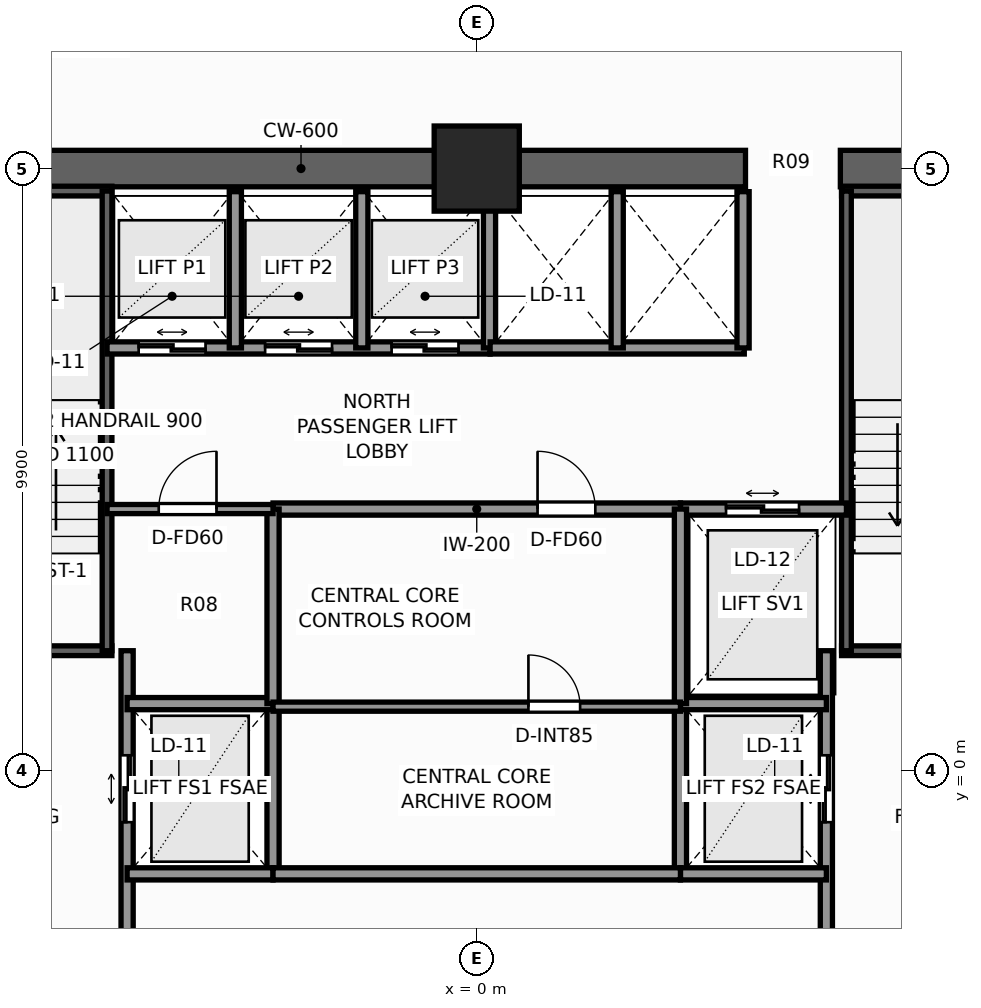
"""IFC4 building model, lengths in metres.
Left out: names, types, materials, properties, quantities, classifications, styles, units other than length and angle.
Written with IfcOpenShell. Run it as: python <this file> out.ifc"""

import sys

from ifc_helpers import new_model, si_unit, direction, frame, frame_2d, origin, origin_2d, place, context, subcontext, project, spatial, rectangle, extrude, element, fill, save


model = new_model("IFC4")
c1 = context("Model", 3, precision=1e-05, world=origin(), true_north=direction((0.0, 1.0)))
c2 = subcontext(c1, "Body", "Model", "MODEL_VIEW")
j1 = project(units=[si_unit("LENGTHUNIT", "METRE"), si_unit("PLANEANGLEUNIT", "RADIAN")], contexts=[c1])
p1 = place(None, origin())
s1 = spatial("IfcSite", under=j1, at=p1, CompositionType="ELEMENT")
p2 = place(p1, origin())
s2 = spatial("IfcBuilding", under=s1, at=p2, CompositionType="ELEMENT")
p3 = place(p2, frame((0.0, 0.0, 33.7)))
s3 = spatial("IfcBuildingStorey", under=s2, at=p3, CompositionType="ELEMENT", Elevation=33.7)
p4 = place(p3, frame((-10.2, 9.9, 0.0), z_axis=(0.0, 0.0, 1.0), x_axis=(1.0, 0.0, 0.0)))
e1 = element("IfcWall", 1, at=p4, inside=s3, PredefinedType="SHEAR", context=c2, shape_type="SweptSolid", body=[
    extrude(rectangle(XDim=14.62, YDim=0.6, at=frame_2d((7.31, 0.0))), origin(), (0.0, 0.0, 1.0), 3.3),
])
p5 = place(p3, frame((5.98, 9.9, 0.0), z_axis=(0.0, 0.0, 1.0), x_axis=(1.0, 0.0, 0.0)))
e2 = element("IfcWall", 2, at=p5, inside=s3, PredefinedType="SHEAR", context=c2, shape_type="SweptSolid", body=[
    extrude(rectangle(XDim=4.22, YDim=0.6, at=frame_2d((2.11, 0.0))), origin(), (0.0, 0.0, 1.0), 3.3),
])
p6 = place(p3, frame((0.0, 9.9, 0.0), z_axis=(0.0, 0.0, 1.0), x_axis=(1.0, 0.0, 0.0)))
e3 = element("IfcColumn", 3, at=p6, inside=s3, PredefinedType="COLUMN", context=c2, shape_type="SweptSolid", body=[
    extrude(rectangle(XDim=1.4, YDim=1.4, at=origin_2d()), origin(), (0.0, 0.0, 1.0), 3.3),
])
p7 = place(p3, frame((-9.52, 1.97, 0.0), z_axis=(0.0, 0.0, 1.0), x_axis=(1.0, 0.0, 0.0)))
e4 = element("IfcWall", 4, at=p7, inside=s3, PredefinedType="SHEAR", context=c2, shape_type="SweptSolid", body=[
    extrude(rectangle(XDim=3.52, YDim=0.16, at=frame_2d((1.76, 0.0))), origin(), (0.0, 0.0, 1.0), 3.3),
])
p8 = place(p7, frame((1.15, 0.0, 0.0)))
e5 = element("IfcOpeningElement", 5, at=p8, cuts=e4, PredefinedType="OPENING", context=c2, shape_type="SweptSolid", body=[
    extrude(rectangle(XDim=1.1, YDim=2.2, at=frame_2d((0.55, 1.1))), frame((0.0, 0.09, 0.0), z_axis=(0.0, -1.0, 0.0), x_axis=(1.0, 0.0, 0.0)), (0.0, 0.0, 1.0), 0.18),
])
p9 = place(p3, frame((-9.52, 9.53, 0.0), z_axis=(0.0, 0.0, 1.0), x_axis=(1.0, 0.0, 0.0)))
e6 = element("IfcWall", 6, at=p9, inside=s3, PredefinedType="SHEAR", context=c2, shape_type="SweptSolid", body=[
    extrude(rectangle(XDim=3.52, YDim=0.16, at=frame_2d((1.76, 0.0))), origin(), (0.0, 0.0, 1.0), 3.3),
])
p10 = place(p3, frame((-6.08, 1.97, 0.0), z_axis=(0.0, 0.0, 1.0), x_axis=(0.0, 1.0, 0.0)))
e7 = element("IfcWall", 7, at=p10, inside=s3, PredefinedType="SHEAR", context=c2, shape_type="SweptSolid", body=[
    extrude(rectangle(XDim=7.56, YDim=0.16, at=frame_2d((3.78, 0.0))), origin(), (0.0, 0.0, 1.0), 3.3),
])
p11 = place(p3, frame((6.0, 1.97, 0.0), z_axis=(0.0, 0.0, 1.0), x_axis=(1.0, 0.0, 0.0)))
e8 = element("IfcWall", 8, at=p11, inside=s3, PredefinedType="SHEAR", context=c2, shape_type="SweptSolid", body=[
    extrude(rectangle(XDim=3.52, YDim=0.16, at=frame_2d((1.76, 0.0))), origin(), (0.0, 0.0, 1.0), 3.3),
])
p12 = place(p11, frame((1.15, 0.0, 0.0)))
e9 = element("IfcOpeningElement", 9, at=p12, cuts=e8, PredefinedType="OPENING", context=c2, shape_type="SweptSolid", body=[
    extrude(rectangle(XDim=1.1, YDim=2.2, at=frame_2d((0.55, 1.1))), frame((0.0, 0.09, 0.0), z_axis=(0.0, -1.0, 0.0), x_axis=(1.0, 0.0, 0.0)), (0.0, 0.0, 1.0), 0.18),
])
p13 = place(p3, frame((6.0, 9.53, 0.0), z_axis=(0.0, 0.0, 1.0), x_axis=(1.0, 0.0, 0.0)))
e10 = element("IfcWall", 10, at=p13, inside=s3, PredefinedType="SHEAR", context=c2, shape_type="SweptSolid", body=[
    extrude(rectangle(XDim=3.52, YDim=0.16, at=frame_2d((1.76, 0.0))), origin(), (0.0, 0.0, 1.0), 3.3),
])
p14 = place(p3, frame((6.08, 1.97, 0.0), z_axis=(0.0, 0.0, 1.0), x_axis=(0.0, 1.0, 0.0)))
e11 = element("IfcWall", 11, at=p14, inside=s3, PredefinedType="SHEAR", context=c2, shape_type="SweptSolid", body=[
    extrude(rectangle(XDim=7.56, YDim=0.16, at=frame_2d((3.78, 0.0))), origin(), (0.0, 0.0, 1.0), 3.3),
])
p15 = place(p3, frame((-5.75, -3.6, 0.0), z_axis=(0.0, 0.0, 1.0), x_axis=(0.0, 1.0, 0.0)))
e12 = element("IfcWall", 12, at=p15, inside=s3, PredefinedType="SOLIDWALL", context=c2, shape_type="SweptSolid", body=[
    extrude(rectangle(XDim=5.57, YDim=0.2, at=frame_2d((2.785, 0.0))), origin(), (0.0, 0.0, 1.0), 3.06),
])
p16 = place(p15, frame((2.75, 0.0, 0.0)))
e13 = element("IfcOpeningElement", 13, at=p16, cuts=e12, PredefinedType="OPENING", context=c2, shape_type="SweptSolid", body=[
    extrude(rectangle(XDim=1.1, YDim=2.2, at=frame_2d((0.55, 1.1))), frame((0.0, 0.11, 0.0), z_axis=(0.0, -1.0, 0.0), x_axis=(1.0, 0.0, 0.0)), (0.0, 0.0, 1.0), 0.22),
])
p17 = place(p3, frame((-3.35, -1.7, 0.0), z_axis=(0.0, 0.0, 1.0), x_axis=(0.0, 1.0, 0.0)))
e14 = element("IfcWall", 14, at=p17, inside=s3, PredefinedType="SOLIDWALL", context=c2, shape_type="SweptSolid", body=[
    extrude(rectangle(XDim=2.8, YDim=0.2, at=frame_2d((1.4, 0.0))), origin(), (0.0, 0.0, 1.0), 3.06),
])
for number, where, z_axis, x_axis in (
    (15, (-5.75, -1.7, 0.0), (0.0, 0.0, 1.0), (1.0, 0.0, 0.0)),
    (16, (-5.75, 1.1, 0.0), (0.0, 0.0, 1.0), (1.0, 0.0, 0.0)),
):
    element("IfcWall", number, at=place(p3, frame(where, z_axis=z_axis, x_axis=x_axis)), inside=s3, PredefinedType="SOLIDWALL", context=c2, shape_type="SweptSolid", body=[
        extrude(rectangle(XDim=2.4, YDim=0.2, at=frame_2d((1.2, 0.0))), origin(), (0.0, 0.0, 1.0), 3.06),
    ])
p18 = place(p3, frame((5.75, -3.6, 0.0), z_axis=(0.0, 0.0, 1.0), x_axis=(0.0, 1.0, 0.0)))
e17 = element("IfcWall", 17, at=p18, inside=s3, PredefinedType="SOLIDWALL", context=c2, shape_type="SweptSolid", body=[
    extrude(rectangle(XDim=5.57, YDim=0.2, at=frame_2d((2.785, 0.0))), origin(), (0.0, 0.0, 1.0), 3.06),
])
p19 = place(p18, frame((2.75, 0.0, 0.0)))
e18 = element("IfcOpeningElement", 18, at=p19, cuts=e17, PredefinedType="OPENING", context=c2, shape_type="SweptSolid", body=[
    extrude(rectangle(XDim=1.1, YDim=2.2, at=frame_2d((0.55, 1.1))), frame((0.0, 0.11, 0.0), z_axis=(0.0, -1.0, 0.0), x_axis=(1.0, 0.0, 0.0)), (0.0, 0.0, 1.0), 0.22),
])
p20 = place(p3, frame((3.35, -1.7, 0.0), z_axis=(0.0, 0.0, 1.0), x_axis=(0.0, 1.0, 0.0)))
e19 = element("IfcWall", 19, at=p20, inside=s3, PredefinedType="SOLIDWALL", context=c2, shape_type="SweptSolid", body=[
    extrude(rectangle(XDim=2.8, YDim=0.2, at=frame_2d((1.4, 0.0))), origin(), (0.0, 0.0, 1.0), 3.06),
])
for number, where, z_axis, x_axis in (
    (20, (3.35, -1.7, 0.0), (0.0, 0.0, 1.0), (1.0, 0.0, 0.0)),
    (21, (3.35, 1.1, 0.0), (0.0, 0.0, 1.0), (1.0, 0.0, 0.0)),
):
    element("IfcWall", number, at=place(p3, frame(where, z_axis=z_axis, x_axis=x_axis)), inside=s3, PredefinedType="SOLIDWALL", context=c2, shape_type="SweptSolid", body=[
        extrude(rectangle(XDim=2.4, YDim=0.2, at=frame_2d((1.2, 0.0))), origin(), (0.0, 0.0, 1.0), 3.06),
    ])
p21 = place(p3, frame((3.35, 4.3, 0.0), z_axis=(0.0, 0.0, 1.0), x_axis=(1.0, 0.0, 0.0)))
e22 = element("IfcWall", 22, at=p21, inside=s3, PredefinedType="SOLIDWALL", context=c2, shape_type="SweptSolid", body=[
    extrude(rectangle(XDim=2.73, YDim=0.2, at=frame_2d((1.365, 0.0))), origin(), (0.0, 0.0, 1.0), 3.06),
])
p22 = place(p21, frame((0.75, 0.0, 0.0)))
e23 = element("IfcOpeningElement", 23, at=p22, cuts=e22, PredefinedType="OPENING", context=c2, shape_type="SweptSolid", body=[
    extrude(rectangle(XDim=1.2, YDim=2.25, at=frame_2d((0.6, 1.125))), frame((0.0, 0.11, 0.0), z_axis=(0.0, -1.0, 0.0), x_axis=(1.0, 0.0, 0.0)), (0.0, 0.0, 1.0), 0.22),
])
p23 = place(p3, frame((-6.08, 6.95, 0.0), z_axis=(0.0, 0.0, 1.0), x_axis=(1.0, 0.0, 0.0)))
e24 = element("IfcWall", 24, at=p23, inside=s3, PredefinedType="SOLIDWALL", context=c2, shape_type="SweptSolid", body=[
    extrude(rectangle(XDim=6.3, YDim=0.2, at=frame_2d((3.15, 0.0))), origin(), (0.0, 0.0, 1.0), 3.06),
])
p24 = place(p23, frame((0.52, 0.0, 0.0)))
e25 = element("IfcOpeningElement", 25, at=p24, cuts=e24, PredefinedType="OPENING", context=c2, shape_type="SweptSolid", body=[
    extrude(rectangle(XDim=1.1, YDim=2.2, at=frame_2d((0.55, 1.1))), frame((0.0, 0.11, 0.0), z_axis=(0.0, -1.0, 0.0), x_axis=(1.0, 0.0, 0.0)), (0.0, 0.0, 1.0), 0.22),
])
p25 = place(p23, frame((2.6, 0.0, 0.0)))
e26 = element("IfcOpeningElement", 26, at=p25, cuts=e24, PredefinedType="OPENING", context=c2, shape_type="SweptSolid", body=[
    extrude(rectangle(XDim=1.1, YDim=2.2, at=frame_2d((0.55, 1.1))), frame((0.0, 0.11, 0.0), z_axis=(0.0, -1.0, 0.0), x_axis=(1.0, 0.0, 0.0)), (0.0, 0.0, 1.0), 0.22),
])
p26 = place(p23, frame((4.68, 0.0, 0.0)))
e27 = element("IfcOpeningElement", 27, at=p26, cuts=e24, PredefinedType="OPENING", context=c2, shape_type="SweptSolid", body=[
    extrude(rectangle(XDim=1.1, YDim=2.2, at=frame_2d((0.55, 1.1))), frame((0.0, 0.11, 0.0), z_axis=(0.0, -1.0, 0.0), x_axis=(1.0, 0.0, 0.0)), (0.0, 0.0, 1.0), 0.22),
])
for number, where, z_axis, x_axis in (
    (28, (-3.97, 6.95, 0.0), (0.0, 0.0, 1.0), (0.0, 1.0, 0.0)),
    (29, (-1.89, 6.95, 0.0), (0.0, 0.0, 1.0), (0.0, 1.0, 0.0)),
    (30, (0.21, 6.95, 0.0), (0.0, 0.0, 1.0), (0.0, 1.0, 0.0)),
):
    element("IfcWall", number, at=place(p3, frame(where, z_axis=z_axis, x_axis=x_axis)), inside=s3, PredefinedType="SOLIDWALL", context=c2, shape_type="SweptSolid", body=[
        extrude(rectangle(XDim=2.57, YDim=0.2, at=frame_2d((1.285, 0.0))), origin(), (0.0, 0.0, 1.0), 3.06),
    ])
p27 = place(p3, frame((0.22, 6.95, 0.0), z_axis=(0.0, 0.0, 1.0), x_axis=(1.0, 0.0, 0.0)))
e31 = element("IfcWall", 31, at=p27, inside=s3, PredefinedType="SOLIDWALL", context=c2, shape_type="SweptSolid", body=[
    extrude(rectangle(XDim=4.18, YDim=0.2, at=frame_2d((2.09, 0.0))), origin(), (0.0, 0.0, 1.0), 3.06),
])
for number, where, z_axis, x_axis in (
    (32, (4.38, 6.95, 0.0), (0.0, 0.0, 1.0), (0.0, 1.0, 0.0)),
    (33, (2.31, 6.95, 0.0), (0.0, 0.0, 1.0), (0.0, 1.0, 0.0)),
):
    element("IfcWall", number, at=place(p3, frame(where, z_axis=z_axis, x_axis=x_axis)), inside=s3, PredefinedType="SOLIDWALL", context=c2, shape_type="SweptSolid", body=[
        extrude(rectangle(XDim=2.57, YDim=0.2, at=frame_2d((1.285, 0.0))), origin(), (0.0, 0.0, 1.0), 3.06),
    ])
p28 = place(p3, frame((-3.35, 4.3, 0.0), z_axis=(0.0, 0.0, 1.0), x_axis=(1.0, 0.0, 0.0)))
e34 = element("IfcWall", 34, at=p28, inside=s3, PredefinedType="SOLIDWALL", context=c2, shape_type="SweptSolid", body=[
    extrude(rectangle(XDim=6.7, YDim=0.2, at=frame_2d((3.35, 0.0))), origin(), (0.0, 0.0, 1.0), 3.06),
])
p29 = place(p28, frame((4.35, 0.0, 0.0)))
e35 = element("IfcOpeningElement", 35, at=p29, cuts=e34, PredefinedType="OPENING", context=c2, shape_type="SweptSolid", body=[
    extrude(rectangle(XDim=0.95, YDim=2.06, at=frame_2d((0.475, 1.03))), frame((0.0, 0.11, 0.0), z_axis=(0.0, -1.0, 0.0), x_axis=(1.0, 0.0, 0.0)), (0.0, 0.0, 1.0), 0.22),
])
p30 = place(p3, frame((-3.35, -1.7, 0.0), z_axis=(0.0, 0.0, 1.0), x_axis=(1.0, 0.0, 0.0)))
e36 = element("IfcWall", 36, at=p30, inside=s3, PredefinedType="SOLIDWALL", context=c2, shape_type="SweptSolid", body=[
    extrude(rectangle(XDim=6.7, YDim=0.2, at=frame_2d((3.35, 0.0))), origin(), (0.0, 0.0, 1.0), 3.06),
])
for number, where, z_axis, x_axis in (
    (37, (-3.35, 1.1, 0.0), (0.0, 0.0, 1.0), (0.0, 1.0, 0.0)),
    (38, (3.35, 1.1, 0.0), (0.0, 0.0, 1.0), (0.0, 1.0, 0.0)),
):
    element("IfcWall", number, at=place(p3, frame(where, z_axis=z_axis, x_axis=x_axis)), inside=s3, PredefinedType="SOLIDWALL", context=c2, shape_type="SweptSolid", body=[
        extrude(rectangle(XDim=3.2, YDim=0.2, at=frame_2d((1.6, 0.0))), origin(), (0.0, 0.0, 1.0), 3.06),
    ])
p31 = place(p3, frame((-3.35, 1.05, 0.0), z_axis=(0.0, 0.0, 1.0), x_axis=(1.0, 0.0, 0.0)))
e39 = element("IfcWall", 39, at=p31, inside=s3, PredefinedType="PARTITIONING", context=c2, shape_type="SweptSolid", body=[
    extrude(rectangle(XDim=6.7, YDim=0.15, at=frame_2d((3.35, 0.0))), origin(), (0.0, 0.0, 1.0), 3.06),
])
p32 = place(p31, frame((4.2, 0.0, 0.0)))
e40 = element("IfcOpeningElement", 40, at=p32, cuts=e39, PredefinedType="OPENING", context=c2, shape_type="SweptSolid", body=[
    extrude(rectangle(XDim=0.85, YDim=2.03, at=frame_2d((0.425, 1.015))), frame((0.0, 0.085, 0.0), z_axis=(0.0, -1.0, 0.0), x_axis=(1.0, 0.0, 0.0)), (0.0, 0.0, 1.0), 0.17),
])
p33 = place(p3, frame((-6.08, 4.3, 0.0), z_axis=(0.0, 0.0, 1.0), x_axis=(1.0, 0.0, 0.0)))
e41 = element("IfcWall", 41, at=p33, inside=s3, PredefinedType="PARTITIONING", context=c2, shape_type="SweptSolid", body=[
    extrude(rectangle(XDim=2.73, YDim=0.15, at=frame_2d((1.365, 0.0))), origin(), (0.0, 0.0, 1.0), 3.06),
])
p34 = place(p33, frame((0.85, 0.0, 0.0)))
e42 = element("IfcOpeningElement", 42, at=p34, cuts=e41, PredefinedType="OPENING", context=c2, shape_type="SweptSolid", body=[
    extrude(rectangle(XDim=0.95, YDim=2.06, at=frame_2d((0.475, 1.03))), frame((0.0, 0.085, 0.0), z_axis=(0.0, -1.0, 0.0), x_axis=(1.0, 0.0, 0.0)), (0.0, 0.0, 1.0), 0.17),
])
p35 = place(p16, origin())
e43 = element("IfcDoor", 43, at=p35, inside=s3, OperationType="DOUBLE_DOOR_SLIDING", PredefinedType="DOOR", context=c2, shape_type="SweptSolid", body=[
    extrude(rectangle(XDim=1.1, YDim=2.2, at=frame_2d((0.55, 1.1))), frame((0.0, 0.025, 0.0), z_axis=(0.0, -1.0, 0.0), x_axis=(1.0, 0.0, 0.0)), (0.0, 0.0, 1.0), 0.05),
])
fill(e13, e43)
p36 = place(p19, origin())
e44 = element("IfcDoor", 44, at=p36, inside=s3, OperationType="DOUBLE_DOOR_SLIDING", PredefinedType="DOOR", context=c2, shape_type="SweptSolid", body=[
    extrude(rectangle(XDim=1.1, YDim=2.2, at=frame_2d((0.55, 1.1))), frame((0.0, 0.025, 0.0), z_axis=(0.0, -1.0, 0.0), x_axis=(1.0, 0.0, 0.0)), (0.0, 0.0, 1.0), 0.05),
])
fill(e18, e44)
p37 = place(p22, origin())
e45 = element("IfcDoor", 45, at=p37, inside=s3, OperationType="DOUBLE_DOOR_SLIDING", PredefinedType="DOOR", context=c2, shape_type="SweptSolid", body=[
    extrude(rectangle(XDim=1.2, YDim=2.25, at=frame_2d((0.6, 1.125))), frame((0.0, 0.025, 0.0), z_axis=(0.0, -1.0, 0.0), x_axis=(1.0, 0.0, 0.0)), (0.0, 0.0, 1.0), 0.05),
])
fill(e23, e45)
p38 = place(p24, origin())
e46 = element("IfcDoor", 46, at=p38, inside=s3, OperationType="DOUBLE_DOOR_SLIDING", PredefinedType="DOOR", context=c2, shape_type="SweptSolid", body=[
    extrude(rectangle(XDim=1.1, YDim=2.2, at=frame_2d((0.55, 1.1))), frame((0.0, 0.025, 0.0), z_axis=(0.0, -1.0, 0.0), x_axis=(1.0, 0.0, 0.0)), (0.0, 0.0, 1.0), 0.05),
])
fill(e25, e46)
p39 = place(p25, origin())
e47 = element("IfcDoor", 47, at=p39, inside=s3, OperationType="DOUBLE_DOOR_SLIDING", PredefinedType="DOOR", context=c2, shape_type="SweptSolid", body=[
    extrude(rectangle(XDim=1.1, YDim=2.2, at=frame_2d((0.55, 1.1))), frame((0.0, 0.025, 0.0), z_axis=(0.0, -1.0, 0.0), x_axis=(1.0, 0.0, 0.0)), (0.0, 0.0, 1.0), 0.05),
])
fill(e26, e47)
p40 = place(p26, origin())
e48 = element("IfcDoor", 48, at=p40, inside=s3, OperationType="DOUBLE_DOOR_SLIDING", PredefinedType="DOOR", context=c2, shape_type="SweptSolid", body=[
    extrude(rectangle(XDim=1.1, YDim=2.2, at=frame_2d((0.55, 1.1))), frame((0.0, 0.025, 0.0), z_axis=(0.0, -1.0, 0.0), x_axis=(1.0, 0.0, 0.0)), (0.0, 0.0, 1.0), 0.05),
])
fill(e27, e48)
p41 = place(p29, origin())
e49 = element("IfcDoor", 49, at=p41, inside=s3, OperationType="SINGLE_SWING_LEFT", PredefinedType="DOOR", context=c2, shape_type="SweptSolid", body=[
    extrude(rectangle(XDim=0.95, YDim=2.06, at=frame_2d((0.475, 1.03))), frame((0.0, 0.025, 0.0), z_axis=(0.0, -1.0, 0.0), x_axis=(1.0, 0.0, 0.0)), (0.0, 0.0, 1.0), 0.05),
])
fill(e35, e49)
p42 = place(p32, origin())
e50 = element("IfcDoor", 50, at=p42, inside=s3, OperationType="SINGLE_SWING_LEFT", PredefinedType="DOOR", context=c2, shape_type="SweptSolid", body=[
    extrude(rectangle(XDim=0.85, YDim=2.03, at=frame_2d((0.425, 1.015))), frame((0.0, 0.025, 0.0), z_axis=(0.0, -1.0, 0.0), x_axis=(1.0, 0.0, 0.0)), (0.0, 0.0, 1.0), 0.05),
])
fill(e40, e50)
p43 = place(p34, origin())
e51 = element("IfcDoor", 51, at=p43, inside=s3, OperationType="SINGLE_SWING_RIGHT", PredefinedType="DOOR", context=c2, shape_type="SweptSolid", body=[
    extrude(rectangle(XDim=0.95, YDim=2.06, at=frame_2d((0.475, 1.03))), frame((0.0, 0.025, 0.0), z_axis=(0.0, -1.0, 0.0), x_axis=(1.0, 0.0, 0.0)), (0.0, 0.0, 1.0), 0.05),
])
fill(e42, e51)
save(model, sys.argv[1])
